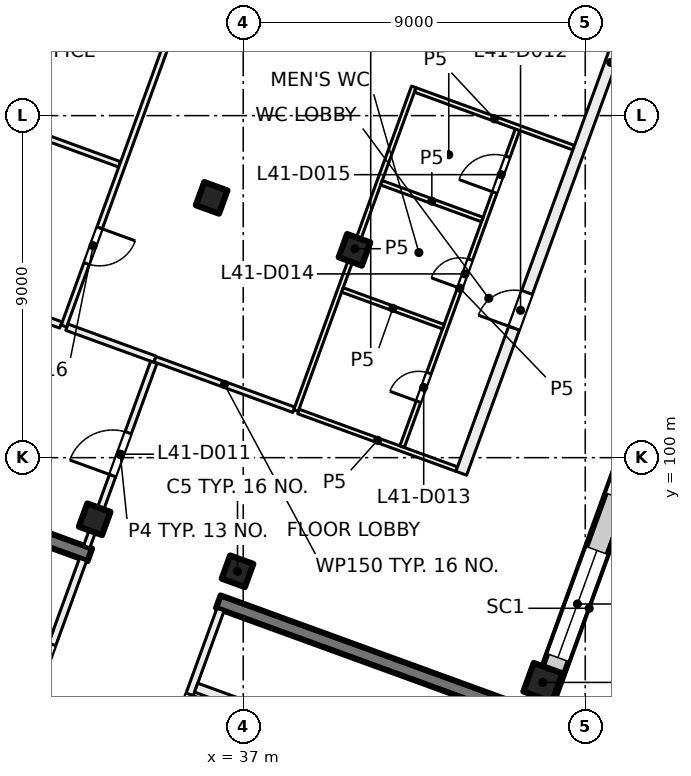
"""IFC4 building model, lengths in metres.
Left out: names, types, materials, properties, quantities, classifications, styles, units other than length and angle.
Written with IfcOpenShell. Run it as: python <this file> out.ifc"""

import sys

from ifc_helpers import new_model, si_unit, direction, frame, frame_2d, origin, origin_2d, place, context, subcontext, project, spatial, rectangle, extrude, element, fill, save


model = new_model("IFC4")
c1 = context("Model", 3, precision=1e-05, world=origin(), true_north=direction((0.0, 1.0)))
c2 = subcontext(c1, "Body", "Model", "MODEL_VIEW")
j1 = project(units=[si_unit("LENGTHUNIT", "METRE"), si_unit("PLANEANGLEUNIT", "RADIAN")], contexts=[c1])
p1 = place(None, origin())
s1 = spatial("IfcSite", under=j1, at=p1, CompositionType="ELEMENT")
p2 = place(p1, origin())
s2 = spatial("IfcBuilding", under=s1, at=p2, CompositionType="ELEMENT")
p3 = place(p2, frame((0.0, 0.0, 174.5)))
s3 = spatial("IfcBuildingStorey", under=s2, at=p3, CompositionType="ELEMENT", Elevation=174.5)
for number, where, z_axis, x_axis in (
    (1, (39.927, 105.468, 0.0), (0.0, 0.0, 1.0), (-0.342, -0.94, 0.0)),
    (2, (36.849, 97.011, 0.0), (0.0, 0.0, 1.0), (-0.342, -0.94, 0.0)),
    (3, (36.169, 106.836, 0.0), (0.0, 0.0, 1.0), (-0.342, -0.94, 0.0)),
    (4, (33.091, 98.379, 0.0), (0.0, 0.0, 1.0), (-0.342, -0.94, 0.0)),
):
    element("IfcColumn", number, at=place(p3, frame(where, z_axis=z_axis, x_axis=x_axis)), inside=s3, PredefinedType="COLUMN", context=c2, shape_type="SweptSolid", body=[
        extrude(rectangle(XDim=0.65, YDim=0.65, at=origin_2d()), origin(), (0.0, 0.0, 1.0), 4.0),
    ])
p4 = place(p3, frame((44.884, 94.087, 0.0), z_axis=(0.0, 0.0, 1.0), x_axis=(-0.342020143326, -0.939692620786, 0.0)))
e5 = element("IfcColumn", 5, at=p4, inside=s3, PredefinedType="COLUMN", context=c2, shape_type="SweptSolid", body=[
    extrude(rectangle(XDim=0.8, YDim=0.8, at=origin_2d()), origin(), (0.0, 0.0, 1.0), 4.0),
])
p5 = place(p3, frame((41.85, 85.241, 0.0), z_axis=(0.0, 0.0, 1.0), x_axis=(0.34201902012, 0.939693029598, 0.0)))
e6 = element("IfcWall", 6, at=p5, inside=s3, PredefinedType="SHEAR", context=c2, shape_type="SweptSolid", body=[
    extrude(rectangle(XDim=8.95, YDim=0.55, at=frame_2d((4.475, 0.0))), origin(), (0.0, 0.0, 1.0), 4.0),
])
p6 = place(p3, frame((44.473, 93.251, 0.0), z_axis=(0.0, 0.0, 1.0), x_axis=(-0.939692847377, 0.34201952077, 0.0)))
e7 = element("IfcWall", 7, at=p6, inside=s3, PredefinedType="SHEAR", context=c2, shape_type="SweptSolid", body=[
    extrude(rectangle(XDim=8.65, YDim=0.35, at=frame_2d((4.325, 0.0))), origin(), (0.0, 0.0, 1.0), 4.0),
])
p7 = place(p3, frame((32.962, 97.441, 0.0), z_axis=(0.0, 0.0, 1.0), x_axis=(-0.939689545667, 0.342028592028, 0.0)))
e8 = element("IfcWall", 8, at=p7, inside=s3, PredefinedType="SHEAR", context=c2, shape_type="SweptSolid", body=[
    extrude(rectangle(XDim=8.65, YDim=0.35, at=frame_2d((4.325, 0.0))), origin(), (0.0, 0.0, 1.0), 4.0),
])
p8 = place(p3, frame((52.212, 113.783, 0.0), z_axis=(0.0, 0.0, 1.0), x_axis=(-0.34202521188, -0.939690775968, 0.0)))
e9 = element("IfcWall", 9, at=p8, inside=s3, PredefinedType="SOLIDWALL", context=c2, shape_type="SweptSolid", body=[
    extrude(rectangle(XDim=21.745, YDim=0.6, at=frame_2d((10.873, 0.0))), origin(), (0.0, 0.0, 1.0), 3.625),
])
p9 = place(p8, frame((3.765, 0.0, 0.9)))
e10 = element("IfcOpeningElement", 10, at=p9, cuts=e9, PredefinedType="OPENING", context=c2, shape_type="SweptSolid", body=[
    extrude(rectangle(XDim=3.0, YDim=2.4, at=frame_2d((1.5, 1.2))), frame((0.0, 0.31, 0.0), z_axis=(0.0, -1.0, 0.0), x_axis=(1.0, 0.0, 0.0)), (0.0, 0.0, 1.0), 0.62),
])
p10 = place(p8, frame((8.265, 0.0, 0.9)))
e11 = element("IfcOpeningElement", 11, at=p10, cuts=e9, PredefinedType="OPENING", context=c2, shape_type="SweptSolid", body=[
    extrude(rectangle(XDim=3.0, YDim=2.4, at=frame_2d((1.5, 1.2))), frame((0.0, 0.31, 0.0), z_axis=(0.0, -1.0, 0.0), x_axis=(1.0, 0.0, 0.0)), (0.0, 0.0, 1.0), 0.62),
])
p11 = place(p8, frame((12.765, 0.0, 0.9)))
e12 = element("IfcOpeningElement", 12, at=p11, cuts=e9, PredefinedType="OPENING", context=c2, shape_type="SweptSolid", body=[
    extrude(rectangle(XDim=3.0, YDim=2.4, at=frame_2d((1.5, 1.2))), frame((0.0, 0.31, 0.0), z_axis=(0.0, -1.0, 0.0), x_axis=(1.0, 0.0, 0.0)), (0.0, 0.0, 1.0), 0.62),
])
p12 = place(p8, frame((17.265, 0.0, 0.9)))
e13 = element("IfcOpeningElement", 13, at=p12, cuts=e9, PredefinedType="OPENING", context=c2, shape_type="SweptSolid", body=[
    extrude(rectangle(XDim=3.0, YDim=2.4, at=frame_2d((1.5, 1.2))), frame((0.0, 0.31, 0.0), z_axis=(0.0, -1.0, 0.0), x_axis=(1.0, 0.0, 0.0)), (0.0, 0.0, 1.0), 0.62),
])
p13 = place(p3, frame((24.666, 100.669, 0.0), z_axis=(0.0, 0.0, 1.0), x_axis=(0.34201964167, 0.939692803373, 0.0)))
e14 = element("IfcWall", 14, at=p13, inside=s3, PredefinedType="SOLIDWALL", context=c2, shape_type="SweptSolid", body=[
    extrude(rectangle(XDim=32.884, YDim=0.6, at=frame_2d((16.442, 0.0))), origin(), (0.0, 0.0, 1.0), 3.625),
])
p14 = place(p13, frame((1.48, 0.0, 0.9)))
e15 = element("IfcOpeningElement", 15, at=p14, cuts=e14, PredefinedType="OPENING", context=c2, shape_type="SweptSolid", body=[
    extrude(rectangle(XDim=3.0, YDim=2.4, at=frame_2d((1.5, 1.2))), frame((0.0, 0.31, 0.0), z_axis=(0.0, -1.0, 0.0), x_axis=(1.0, 0.0, 0.0)), (0.0, 0.0, 1.0), 0.62),
])
p15 = place(p13, frame((5.98, 0.0, 0.9)))
e16 = element("IfcOpeningElement", 16, at=p15, cuts=e14, PredefinedType="OPENING", context=c2, shape_type="SweptSolid", body=[
    extrude(rectangle(XDim=3.0, YDim=2.4, at=frame_2d((1.5, 1.2))), frame((0.0, 0.31, 0.0), z_axis=(0.0, -1.0, 0.0), x_axis=(1.0, 0.0, 0.0)), (0.0, 0.0, 1.0), 0.62),
])
p16 = place(p13, frame((10.48, 0.0, 0.9)))
e17 = element("IfcOpeningElement", 17, at=p16, cuts=e14, PredefinedType="OPENING", context=c2, shape_type="SweptSolid", body=[
    extrude(rectangle(XDim=3.0, YDim=2.4, at=frame_2d((1.5, 1.2))), frame((0.0, 0.31, 0.0), z_axis=(0.0, -1.0, 0.0), x_axis=(1.0, 0.0, 0.0)), (0.0, 0.0, 1.0), 0.62),
])
p17 = place(p13, frame((14.98, 0.0, 0.9)))
e18 = element("IfcOpeningElement", 18, at=p17, cuts=e14, PredefinedType="OPENING", context=c2, shape_type="SweptSolid", body=[
    extrude(rectangle(XDim=3.0, YDim=2.4, at=frame_2d((1.5, 1.2))), frame((0.0, 0.31, 0.0), z_axis=(0.0, -1.0, 0.0), x_axis=(1.0, 0.0, 0.0)), (0.0, 0.0, 1.0), 0.62),
])
p18 = place(p13, frame((19.48, 0.0, 0.9)))
e19 = element("IfcOpeningElement", 19, at=p18, cuts=e14, PredefinedType="OPENING", context=c2, shape_type="SweptSolid", body=[
    extrude(rectangle(XDim=3.0, YDim=2.4, at=frame_2d((1.5, 1.2))), frame((0.0, 0.31, 0.0), z_axis=(0.0, -1.0, 0.0), x_axis=(1.0, 0.0, 0.0)), (0.0, 0.0, 1.0), 0.62),
])
p19 = place(p13, frame((23.98, 0.0, 0.9)))
e20 = element("IfcOpeningElement", 20, at=p19, cuts=e14, PredefinedType="OPENING", context=c2, shape_type="SweptSolid", body=[
    extrude(rectangle(XDim=3.0, YDim=2.4, at=frame_2d((1.5, 1.2))), frame((0.0, 0.31, 0.0), z_axis=(0.0, -1.0, 0.0), x_axis=(1.0, 0.0, 0.0)), (0.0, 0.0, 1.0), 0.62),
])
p20 = place(p13, frame((28.48, 0.0, 0.9)))
e21 = element("IfcOpeningElement", 21, at=p20, cuts=e14, PredefinedType="OPENING", context=c2, shape_type="SweptSolid", body=[
    extrude(rectangle(XDim=3.0, YDim=2.4, at=frame_2d((1.5, 1.2))), frame((0.0, 0.31, 0.0), z_axis=(0.0, -1.0, 0.0), x_axis=(1.0, 0.0, 0.0)), (0.0, 0.0, 1.0), 0.62),
])
p21 = place(p3, frame((31.459, 93.678, 0.0), z_axis=(0.0, 0.0, 1.0), x_axis=(0.341985870128, 0.939705094502, 0.0)))
e22 = element("IfcWall", 22, at=p21, inside=s3, PredefinedType="PARTITIONING", context=c2, shape_type="SweptSolid", body=[
    extrude(rectangle(XDim=3.875, YDim=0.2, at=frame_2d((1.938, 0.0))), origin(), (0.0, 0.0, 1.0), 3.625),
])
p22 = place(p21, frame((0.3, 0.0, 0.0)))
e23 = element("IfcOpeningElement", 23, at=p22, cuts=e22, PredefinedType="OPENING", context=c2, shape_type="SweptSolid", body=[
    extrude(rectangle(XDim=1.2, YDim=2.1, at=frame_2d((0.6, 1.05))), frame((0.0, 0.11, 0.0), z_axis=(0.0, -1.0, 0.0), x_axis=(1.0, 0.0, 0.0)), (0.0, 0.0, 1.0), 0.22),
])
p23 = place(p3, frame((24.039, 98.215, 0.0), z_axis=(0.0, 0.0, 1.0), x_axis=(0.939687617333, -0.342033889887, 0.0)))
e24 = element("IfcWall", 24, at=p23, inside=s3, PredefinedType="PARTITIONING", context=c2, shape_type="SweptSolid", body=[
    extrude(rectangle(XDim=8.425, YDim=0.25, at=frame_2d((4.212, 0.0))), origin(), (0.0, 0.0, 1.0), 3.625),
])
p24 = place(p23, frame((5.242, 0.0, 0.0)))
e25 = element("IfcOpeningElement", 25, at=p24, cuts=e24, PredefinedType="OPENING", context=c2, shape_type="SweptSolid", body=[
    extrude(rectangle(XDim=0.8, YDim=2.1, at=frame_2d((0.4, 1.05))), frame((0.0, 0.135, 0.0), z_axis=(0.0, -1.0, 0.0), x_axis=(1.0, 0.0, 0.0)), (0.0, 0.0, 1.0), 0.27),
])
p25 = place(p23, frame((0.98, 0.0, 0.0)))
e26 = element("IfcOpeningElement", 26, at=p25, cuts=e24, PredefinedType="OPENING", context=c2, shape_type="SweptSolid", body=[
    extrude(rectangle(XDim=0.8, YDim=2.1, at=frame_2d((0.4, 1.05))), frame((0.0, 0.135, 0.0), z_axis=(0.0, -1.0, 0.0), x_axis=(1.0, 0.0, 0.0)), (0.0, 0.0, 1.0), 0.27),
])
p26 = place(p3, frame((36.403, 96.003, 0.0), z_axis=(0.0, 0.0, 1.0), x_axis=(-0.342041503764, -0.939684845947, 0.0)))
e27 = element("IfcWall", 27, at=p26, inside=s3, PredefinedType="PARTITIONING", context=c2, shape_type="SweptSolid", body=[
    extrude(rectangle(XDim=3.875, YDim=0.2, at=frame_2d((1.938, 0.0))), origin(), (0.0, 0.0, 1.0), 3.625),
])
p27 = place(p26, frame((2.375, 0.0, 0.0)))
e28 = element("IfcOpeningElement", 28, at=p27, cuts=e27, PredefinedType="OPENING", context=c2, shape_type="SweptSolid", body=[
    extrude(rectangle(XDim=1.2, YDim=2.1, at=frame_2d((0.6, 1.05))), frame((0.0, 0.11, 0.0), z_axis=(0.0, -1.0, 0.0), x_axis=(1.0, 0.0, 0.0)), (0.0, 0.0, 1.0), 0.22),
])
p28 = place(p3, frame((35.761, 93.948, 0.0), z_axis=(0.0, 0.0, 1.0), x_axis=(0.93969693093, -0.342008301071, 0.0)))
e29 = element("IfcWall", 29, at=p28, inside=s3, PredefinedType="PARTITIONING", context=c2, shape_type="SweptSolid", body=[
    extrude(rectangle(XDim=8.425, YDim=0.25, at=frame_2d((4.212, 0.0))), origin(), (0.0, 0.0, 1.0), 3.625),
])
p29 = place(p28, frame((3.712, 0.0, 0.0)))
e30 = element("IfcOpeningElement", 30, at=p29, cuts=e29, PredefinedType="OPENING", context=c2, shape_type="SweptSolid", body=[
    extrude(rectangle(XDim=1.0, YDim=2.1, at=frame_2d((0.5, 1.05))), frame((0.0, 0.135, 0.0), z_axis=(0.0, -1.0, 0.0), x_axis=(1.0, 0.0, 0.0)), (0.0, 0.0, 1.0), 0.27),
])
p30 = place(p3, frame((26.736, 105.48, 0.0), z_axis=(0.0, 0.0, 1.0), x_axis=(0.939674453825, -0.342070052516, 0.0)))
e31 = element("IfcWall", 31, at=p30, inside=s3, PredefinedType="PARTITIONING", context=c2, shape_type="SweptSolid", body=[
    extrude(rectangle(XDim=5.815, YDim=0.175, at=frame_2d((2.907, 0.0))), origin(), (0.0, 0.0, 1.0), 3.625),
])
p31 = place(p3, frame((28.275, 109.709, 0.0), z_axis=(0.0, 0.0, 1.0), x_axis=(0.939718757431, -0.341948324943, 0.0)))
e32 = element("IfcWall", 32, at=p31, inside=s3, PredefinedType="PARTITIONING", context=c2, shape_type="SweptSolid", body=[
    extrude(rectangle(XDim=5.825, YDim=0.15, at=frame_2d((2.913, 0.0))), origin(), (0.0, 0.0, 1.0), 3.625),
])
p32 = place(p3, frame((32.359, 103.433, 0.0), z_axis=(0.0, 0.0, 1.0), x_axis=(0.939784753685, -0.341766904105, 0.0)))
e33 = element("IfcWall", 33, at=p32, inside=s3, PredefinedType="PARTITIONING", context=c2, shape_type="SweptSolid", body=[
    extrude(rectangle(XDim=2.467, YDim=0.175, at=frame_2d((1.233, 0.0))), origin(), (0.0, 0.0, 1.0), 3.625),
])
p33 = place(p3, frame((32.881, 97.657, 0.0), z_axis=(0.0, 0.0, 1.0), x_axis=(0.342058204353, 0.939678766832, 0.0)))
e34 = element("IfcWall", 34, at=p33, inside=s3, PredefinedType="PARTITIONING", context=c2, shape_type="SweptSolid", body=[
    extrude(rectangle(XDim=5.163, YDim=0.175, at=frame_2d((2.581, 0.0))), origin(), (0.0, 0.0, 1.0), 3.625),
])
p34 = place(p33, frame((1.991, 0.0, 0.0)))
e35 = element("IfcOpeningElement", 35, at=p34, cuts=e34, PredefinedType="OPENING", context=c2, shape_type="SweptSolid", body=[
    extrude(rectangle(XDim=1.2, YDim=2.1, at=frame_2d((0.6, 1.05))), frame((0.0, 0.097, 0.0), z_axis=(0.0, -1.0, 0.0), x_axis=(1.0, 0.0, 0.0)), (0.0, 0.0, 1.0), 0.195),
])
p35 = place(p3, frame((34.677, 102.59, 0.0), z_axis=(0.0, 0.0, 1.0), x_axis=(0.939712759945, -0.341964806371, 0.0)))
e36 = element("IfcWall", 36, at=p35, inside=s3, PredefinedType="PARTITIONING", context=c2, shape_type="SweptSolid", body=[
    extrude(rectangle(XDim=3.889, YDim=0.15, at=frame_2d((1.945, 0.0))), origin(), (0.0, 0.0, 1.0), 3.625),
])
p36 = place(p3, frame((35.385, 111.99, 0.0), z_axis=(0.0, 0.0, 1.0), x_axis=(-0.342153449842, -0.939644090473, 0.0)))
e37 = element("IfcWall", 37, at=p36, inside=s3, PredefinedType="PARTITIONING", context=c2, shape_type="SweptSolid", body=[
    extrude(rectangle(XDim=9.075, YDim=0.15, at=frame_2d((4.537, 0.0))), origin(), (0.0, 0.0, 1.0), 3.625),
])
p37 = place(p36, frame((6.325, 0.0, 0.0)))
e38 = element("IfcOpeningElement", 38, at=p37, cuts=e37, PredefinedType="OPENING", context=c2, shape_type="SweptSolid", body=[
    extrude(rectangle(XDim=1.0, YDim=2.1, at=frame_2d((0.5, 1.05))), frame((0.0, 0.085, 0.0), z_axis=(0.0, -1.0, 0.0), x_axis=(1.0, 0.0, 0.0)), (0.0, 0.0, 1.0), 0.17),
])
p38 = place(p3, frame((38.455, 101.214, 0.0), z_axis=(0.0, 0.0, 1.0), x_axis=(0.939738687483, -0.341893549585, 0.0)))
e39 = element("IfcWall", 39, at=p38, inside=s3, PredefinedType="PARTITIONING", context=c2, shape_type="SweptSolid", body=[
    extrude(rectangle(XDim=4.429, YDim=0.125, at=frame_2d((2.214, 0.0))), origin(), (0.0, 0.0, 1.0), 3.625),
])
p39 = place(p3, frame((38.388, 101.24, 0.0), z_axis=(0.0, 0.0, 1.0), x_axis=(0.342067486799, 0.93967538782, 0.0)))
e40 = element("IfcWall", 40, at=p39, inside=s3, PredefinedType="PARTITIONING", context=c2, shape_type="SweptSolid", body=[
    extrude(rectangle(XDim=9.063, YDim=0.125, at=frame_2d((4.531, 0.0))), origin(), (0.0, 0.0, 1.0), 3.625),
])
p40 = place(p3, frame((41.181, 100.29, 0.0), z_axis=(0.0, 0.0, 1.0), x_axis=(0.34222012082, 0.939619810831, 0.0)))
e41 = element("IfcWall", 41, at=p40, inside=s3, PredefinedType="PARTITIONING", context=c2, shape_type="SweptSolid", body=[
    extrude(rectangle(XDim=8.875, YDim=0.125, at=frame_2d((4.438, 0.0))), origin(), (0.0, 0.0, 1.0), 3.625),
])
p41 = place(p40, frame((1.258, 0.0, 0.0)))
e42 = element("IfcOpeningElement", 42, at=p41, cuts=e41, PredefinedType="OPENING", context=c2, shape_type="SweptSolid", body=[
    extrude(rectangle(XDim=0.8, YDim=2.1, at=frame_2d((0.4, 1.05))), frame((0.0, 0.073, 0.0), z_axis=(0.0, -1.0, 0.0), x_axis=(1.0, 0.0, 0.0)), (0.0, 0.0, 1.0), 0.145),
])
p42 = place(p40, frame((4.437, 0.0, 0.0)))
e43 = element("IfcOpeningElement", 43, at=p42, cuts=e41, PredefinedType="OPENING", context=c2, shape_type="SweptSolid", body=[
    extrude(rectangle(XDim=0.8, YDim=2.1, at=frame_2d((0.4, 1.05))), frame((0.0, 0.073, 0.0), z_axis=(0.0, -1.0, 0.0), x_axis=(1.0, 0.0, 0.0)), (0.0, 0.0, 1.0), 0.145),
])
p43 = place(p40, frame((7.116, 0.0, 0.0)))
e44 = element("IfcOpeningElement", 44, at=p43, cuts=e41, PredefinedType="OPENING", context=c2, shape_type="SweptSolid", body=[
    extrude(rectangle(XDim=1.0, YDim=2.1, at=frame_2d((0.5, 1.05))), frame((0.0, 0.073, 0.0), z_axis=(0.0, -1.0, 0.0), x_axis=(1.0, 0.0, 0.0)), (0.0, 0.0, 1.0), 0.145),
])
p44 = place(p3, frame((41.526, 109.676, 0.0), z_axis=(0.0, 0.0, 1.0), x_axis=(0.939577975992, -0.342334963203, 0.0)))
e45 = element("IfcWall", 45, at=p44, inside=s3, PredefinedType="PARTITIONING", context=c2, shape_type="SweptSolid", body=[
    extrude(rectangle(XDim=4.437, YDim=0.125, at=frame_2d((2.219, 0.0))), origin(), (0.0, 0.0, 1.0), 3.625),
])
p45 = place(p3, frame((42.264, 103.446, 0.0), z_axis=(0.0, 0.0, 1.0), x_axis=(-0.939563555473, 0.342374539396, 0.0)))
e46 = element("IfcWall", 46, at=p45, inside=s3, PredefinedType="PARTITIONING", context=c2, shape_type="SweptSolid", body=[
    extrude(rectangle(XDim=2.824, YDim=0.125, at=frame_2d((1.412, 0.0))), origin(), (0.0, 0.0, 1.0), 3.625),
])
p46 = place(p3, frame((42.737, 99.59, 0.0), z_axis=(0.0, 0.0, 1.0), x_axis=(0.341992703977, 0.939702607438, 0.0)))
e47 = element("IfcWall", 47, at=p46, inside=s3, PredefinedType="PARTITIONING", context=c2, shape_type="SweptSolid", body=[
    extrude(rectangle(XDim=23.006, YDim=0.3, at=frame_2d((11.503, 0.0))), origin(), (0.0, 0.0, 1.0), 3.625),
])
p47 = place(p46, frame((4.062, 0.0, 0.0)))
e48 = element("IfcOpeningElement", 48, at=p47, cuts=e47, PredefinedType="OPENING", context=c2, shape_type="SweptSolid", body=[
    extrude(rectangle(XDim=1.0, YDim=2.1, at=frame_2d((0.5, 1.05))), frame((0.0, 0.16, 0.0), z_axis=(0.0, -1.0, 0.0), x_axis=(1.0, 0.0, 0.0)), (0.0, 0.0, 1.0), 0.32),
])
p48 = place(p46, frame((14.912, 0.0, 0.0)))
e49 = element("IfcOpeningElement", 49, at=p48, cuts=e47, PredefinedType="OPENING", context=c2, shape_type="SweptSolid", body=[
    extrude(rectangle(XDim=1.8, YDim=2.1, at=frame_2d((0.9, 1.05))), frame((0.0, 0.16, 0.0), z_axis=(0.0, -1.0, 0.0), x_axis=(1.0, 0.0, 0.0)), (0.0, 0.0, 1.0), 0.32),
])
p49 = place(p3, frame((43.29, 106.266, 0.0), z_axis=(0.0, 0.0, 1.0), x_axis=(-0.939601484935, 0.342270433294, 0.0)))
e50 = element("IfcWall", 50, at=p49, inside=s3, PredefinedType="PARTITIONING", context=c2, shape_type="SweptSolid", body=[
    extrude(rectangle(XDim=2.825, YDim=0.125, at=frame_2d((1.412, 0.0))), origin(), (0.0, 0.0, 1.0), 3.625),
])
p50 = place(p12, origin())
e51 = element("IfcWindow", 51, at=p50, inside=s3, PartitioningType="SINGLE_PANEL", PredefinedType="WINDOW", context=c2, shape_type="SweptSolid", body=[
    extrude(rectangle(XDim=3.0, YDim=2.4, at=frame_2d((1.5, 1.2))), frame((0.0, 0.03, 0.0), z_axis=(0.0, -1.0, 0.0), x_axis=(1.0, 0.0, 0.0)), (0.0, 0.0, 1.0), 0.06),
])
fill(e13, e51)
p51 = place(p22, origin())
e52 = element("IfcDoor", 52, at=p51, inside=s3, OperationType="DOUBLE_DOOR_SINGLE_SWING", PredefinedType="DOOR", context=c2, shape_type="SweptSolid", body=[
    extrude(rectangle(XDim=1.2, YDim=2.1, at=frame_2d((0.6, 1.05))), frame((0.0, 0.025, 0.0), z_axis=(0.0, -1.0, 0.0), x_axis=(1.0, 0.0, 0.0)), (0.0, 0.0, 1.0), 0.05),
])
fill(e23, e52)
p52 = place(p27, origin())
e53 = element("IfcDoor", 53, at=p52, inside=s3, OperationType="DOUBLE_DOOR_SINGLE_SWING", PredefinedType="DOOR", context=c2, shape_type="SweptSolid", body=[
    extrude(rectangle(XDim=1.2, YDim=2.1, at=frame_2d((0.6, 1.05))), frame((0.0, 0.025, 0.0), z_axis=(0.0, -1.0, 0.0), x_axis=(1.0, 0.0, 0.0)), (0.0, 0.0, 1.0), 0.05),
])
fill(e28, e53)
p53 = place(p34, origin())
e54 = element("IfcDoor", 54, at=p53, inside=s3, OperationType="DOUBLE_DOOR_SINGLE_SWING", PredefinedType="DOOR", context=c2, shape_type="SweptSolid", body=[
    extrude(rectangle(XDim=1.2, YDim=2.1, at=frame_2d((0.6, 1.05))), frame((0.0, 0.025, 0.0), z_axis=(0.0, -1.0, 0.0), x_axis=(1.0, 0.0, 0.0)), (0.0, 0.0, 1.0), 0.05),
])
fill(e35, e54)
p54 = place(p47, origin())
e55 = element("IfcDoor", 55, at=p54, inside=s3, OperationType="SINGLE_SWING_LEFT", PredefinedType="DOOR", context=c2, shape_type="SweptSolid", body=[
    extrude(rectangle(XDim=1.0, YDim=2.1, at=frame_2d((0.5, 1.05))), frame((0.0, 0.025, 0.0), z_axis=(0.0, -1.0, 0.0), x_axis=(1.0, 0.0, 0.0)), (0.0, 0.0, 1.0), 0.05),
])
fill(e48, e55)
p55 = place(p41, origin())
e56 = element("IfcDoor", 56, at=p55, inside=s3, OperationType="SINGLE_SWING_LEFT", PredefinedType="DOOR", context=c2, shape_type="SweptSolid", body=[
    extrude(rectangle(XDim=0.8, YDim=2.1, at=frame_2d((0.4, 1.05))), frame((0.0, 0.025, 0.0), z_axis=(0.0, -1.0, 0.0), x_axis=(1.0, 0.0, 0.0)), (0.0, 0.0, 1.0), 0.05),
])
fill(e42, e56)
p56 = place(p42, origin())
e57 = element("IfcDoor", 57, at=p56, inside=s3, OperationType="SINGLE_SWING_LEFT", PredefinedType="DOOR", context=c2, shape_type="SweptSolid", body=[
    extrude(rectangle(XDim=0.8, YDim=2.1, at=frame_2d((0.4, 1.05))), frame((0.0, 0.025, 0.0), z_axis=(0.0, -1.0, 0.0), x_axis=(1.0, 0.0, 0.0)), (0.0, 0.0, 1.0), 0.05),
])
fill(e43, e57)
p57 = place(p43, origin())
e58 = element("IfcDoor", 58, at=p57, inside=s3, OperationType="SINGLE_SWING_LEFT", PredefinedType="DOOR", context=c2, shape_type="SweptSolid", body=[
    extrude(rectangle(XDim=1.0, YDim=2.1, at=frame_2d((0.5, 1.05))), frame((0.0, 0.025, 0.0), z_axis=(0.0, -1.0, 0.0), x_axis=(1.0, 0.0, 0.0)), (0.0, 0.0, 1.0), 0.05),
])
fill(e44, e58)
p58 = place(p37, origin())
e59 = element("IfcDoor", 59, at=p58, inside=s3, OperationType="SINGLE_SWING_LEFT", PredefinedType="DOOR", context=c2, shape_type="SweptSolid", body=[
    extrude(rectangle(XDim=1.0, YDim=2.1, at=frame_2d((0.5, 1.05))), frame((0.0, 0.025, 0.0), z_axis=(0.0, -1.0, 0.0), x_axis=(1.0, 0.0, 0.0)), (0.0, 0.0, 1.0), 0.05),
])
fill(e38, e59)
save(model, sys.argv[1])
